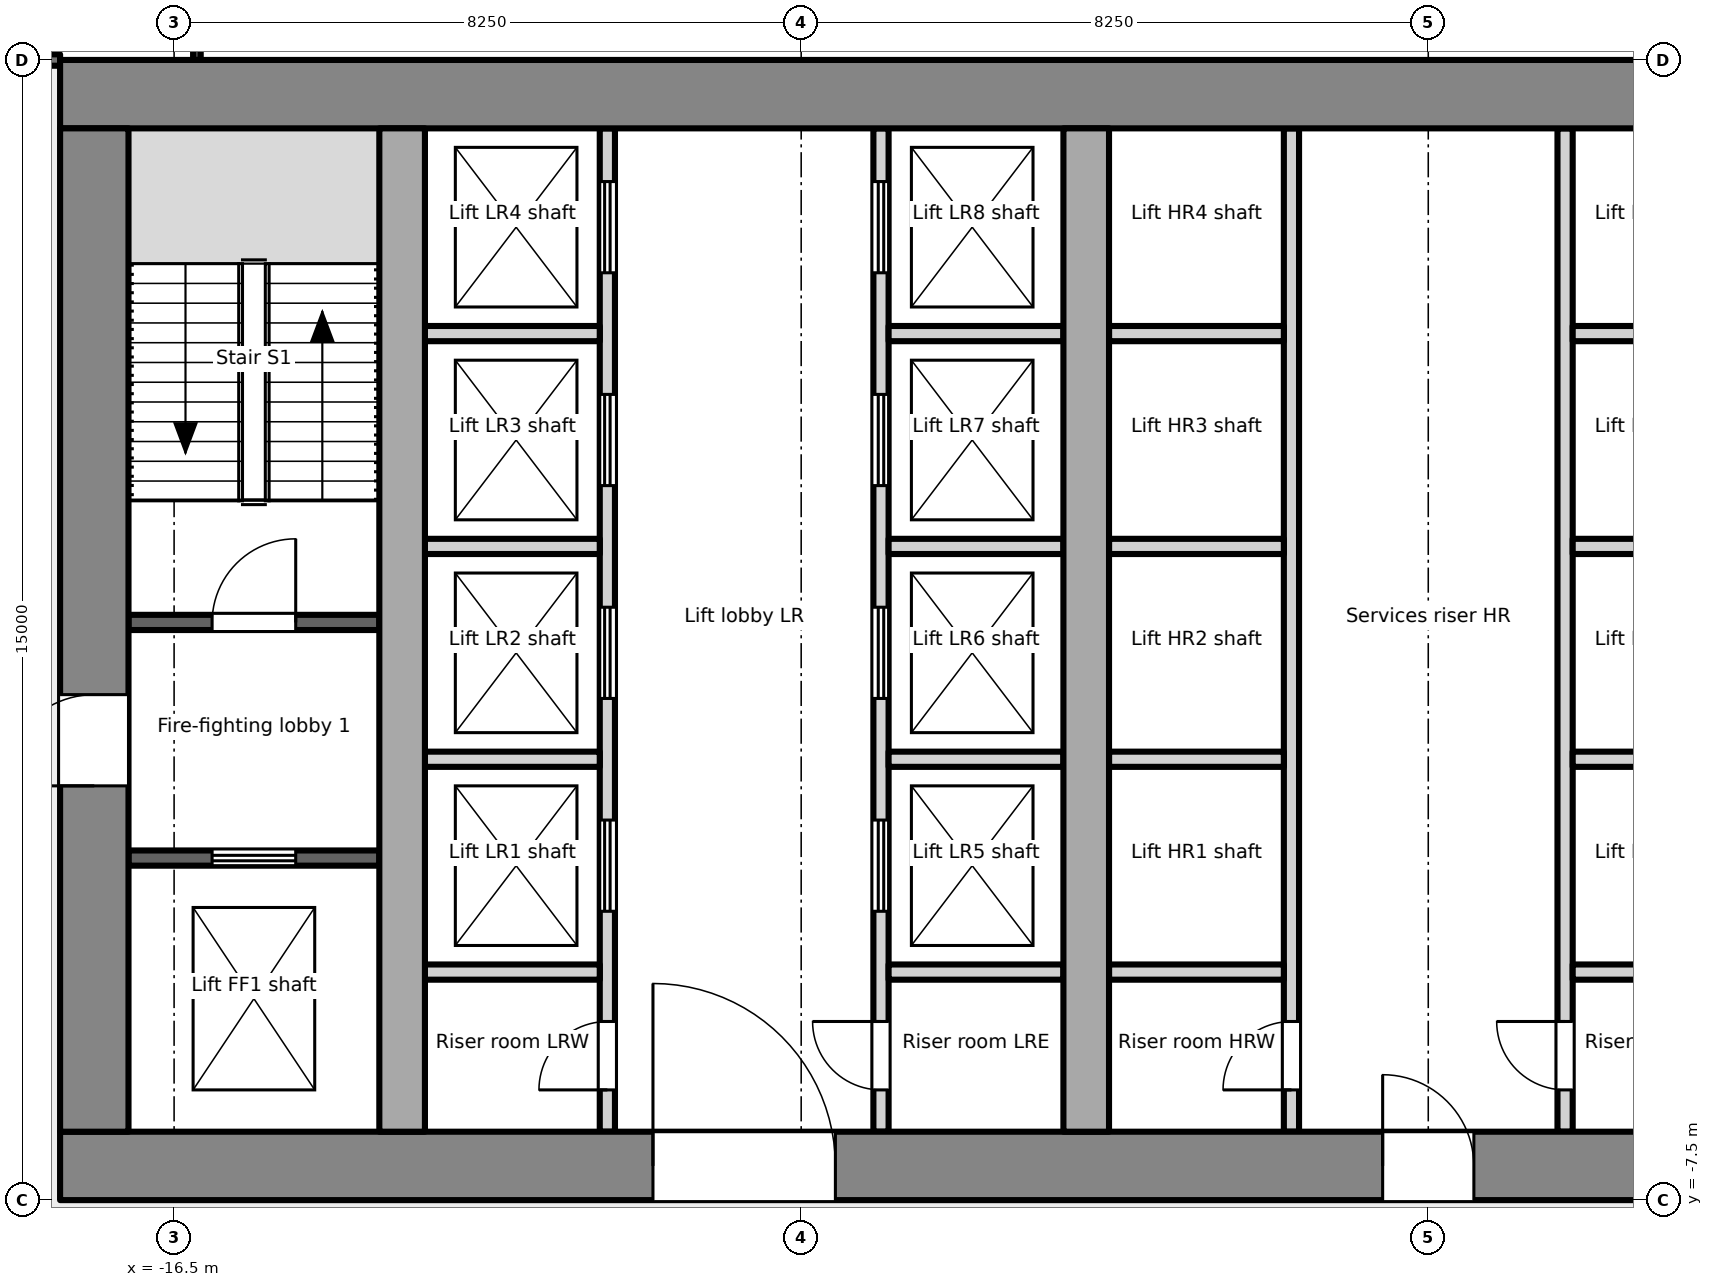
"""IFC4 building model, lengths in metres.
Left out: names, types, materials, properties, quantities, classifications, styles, units other than length and angle.
Written with IfcOpenShell. Run it as: python <this file> out.ifc"""

import sys

from ifc_helpers import new_model, si_unit, direction, frame, frame_2d, origin, place, context, subcontext, project, spatial, rectangle, extrude, element, fill, save


model = new_model("IFC4")
c1 = context("Model", 3, precision=1e-05, world=origin(), true_north=direction((0.0, 1.0)))
c2 = subcontext(c1, "Body", "Model", "MODEL_VIEW")
j1 = project(units=[si_unit("LENGTHUNIT", "METRE"), si_unit("PLANEANGLEUNIT", "RADIAN")], contexts=[c1])
p1 = place(None, origin())
s1 = spatial("IfcSite", under=j1, at=p1, CompositionType="ELEMENT")
p2 = place(p1, origin())
s2 = spatial("IfcBuilding", under=s1, at=p2, CompositionType="ELEMENT")
p3 = place(p2, frame((0.0, 0.0, 12.6)))
s3 = spatial("IfcBuildingStorey", under=s2, at=p3, CompositionType="ELEMENT", Elevation=12.6)
p4 = place(p3, frame((-18.0, -7.05, -0.2), z_axis=(0.0, 0.0, 1.0), x_axis=(1.0, 0.0, 0.0)))
e1 = element("IfcWall", 1, at=p4, inside=s3, PredefinedType="SHEAR", context=c2, shape_type="SweptSolid", body=[
    extrude(rectangle(XDim=36.0, YDim=0.9, at=frame_2d((18.0, 0.0))), origin(), (0.0, 0.0, 1.0), 4.8),
])
p5 = place(p4, frame((7.8, 0.0, 0.2)))
e2 = element("IfcOpeningElement", 2, at=p5, cuts=e1, PredefinedType="OPENING", context=c2, shape_type="SweptSolid", body=[
    extrude(rectangle(XDim=2.4, YDim=2.1, at=frame_2d((1.2, 1.05))), frame((0.0, 0.46, 0.0), z_axis=(0.0, -1.0, 0.0), x_axis=(1.0, 0.0, 0.0)), (0.0, 0.0, 1.0), 0.921),
])
p6 = place(p4, frame((17.4, 0.0, 0.2)))
e3 = element("IfcOpeningElement", 3, at=p6, cuts=e1, PredefinedType="OPENING", context=c2, shape_type="SweptSolid", body=[
    extrude(rectangle(XDim=1.2, YDim=2.1, at=frame_2d((0.6, 1.05))), frame((0.0, 0.46, 0.0), z_axis=(0.0, -1.0, 0.0), x_axis=(1.0, 0.0, 0.0)), (0.0, 0.0, 1.0), 0.921),
])
p7 = place(p4, frame((26.1, 0.0, 0.2)))
e4 = element("IfcOpeningElement", 4, at=p7, cuts=e1, PredefinedType="OPENING", context=c2, shape_type="SweptSolid", body=[
    extrude(rectangle(XDim=2.4, YDim=2.1, at=frame_2d((1.2, 1.05))), frame((0.0, 0.46, 0.0), z_axis=(0.0, -1.0, 0.0), x_axis=(1.0, 0.0, 0.0)), (0.0, 0.0, 1.0), 0.921),
])
p8 = place(p3, frame((-18.0, 7.05, -0.2), z_axis=(0.0, 0.0, 1.0), x_axis=(1.0, 0.0, 0.0)))
e5 = element("IfcWall", 5, at=p8, inside=s3, PredefinedType="SHEAR", context=c2, shape_type="SweptSolid", body=[
    extrude(rectangle(XDim=36.0, YDim=0.9, at=frame_2d((18.0, 0.0))), origin(), (0.0, 0.0, 1.0), 4.8),
])
p9 = place(p3, frame((-17.55, -6.6, -0.2), z_axis=(0.0, 0.0, 1.0), x_axis=(0.0, 1.0, 0.0)))
e6 = element("IfcWall", 6, at=p9, inside=s3, PredefinedType="SHEAR", context=c2, shape_type="SweptSolid", body=[
    extrude(rectangle(XDim=13.2, YDim=0.9, at=frame_2d((6.6, 0.0))), origin(), (0.0, 0.0, 1.0), 4.8),
])
p10 = place(p9, frame((4.55, 0.0, 0.2)))
e7 = element("IfcOpeningElement", 7, at=p10, cuts=e6, PredefinedType="OPENING", context=c2, shape_type="SweptSolid", body=[
    extrude(rectangle(XDim=1.2, YDim=2.1, at=frame_2d((0.6, 1.05))), frame((0.0, 0.46, 0.0), z_axis=(0.0, -1.0, 0.0), x_axis=(1.0, 0.0, 0.0)), (0.0, 0.0, 1.0), 0.921),
])
for number, where, z_axis, x_axis in (
    (8, (-13.5, -6.6, -0.2), (0.0, 0.0, 1.0), (0.0, 1.0, 0.0)),
    (9, (-4.5, -6.6, -0.2), (0.0, 0.0, 1.0), (0.0, 1.0, 0.0)),
):
    element("IfcWall", number, at=place(p3, frame(where, z_axis=z_axis, x_axis=x_axis)), inside=s3, PredefinedType="SHEAR", context=c2, shape_type="SweptSolid", body=[
        extrude(rectangle(XDim=13.2, YDim=0.6, at=frame_2d((6.6, 0.0))), origin(), (0.0, 0.0, 1.0), 4.8),
    ])
p11 = place(p3, frame((-17.1, -3.0, 0.0), z_axis=(0.0, 0.0, 1.0), x_axis=(1.0, 0.0, 0.0)))
e10 = element("IfcWall", 10, at=p11, inside=s3, PredefinedType="PARTITIONING", context=c2, shape_type="SweptSolid", body=[
    extrude(rectangle(XDim=3.3, YDim=0.2, at=frame_2d((1.65, 0.0))), origin(), (0.0, 0.0, 1.0), 4.6),
])
p12 = place(p11, frame((1.1, 0.0, 0.0)))
e11 = element("IfcOpeningElement", 11, at=p12, cuts=e10, PredefinedType="OPENING", context=c2, shape_type="SweptSolid", body=[
    extrude(rectangle(XDim=1.1, YDim=2.1, at=frame_2d((0.55, 1.05))), frame((0.0, 0.111, 0.0), z_axis=(0.0, -1.0, 0.0), x_axis=(1.0, 0.0, 0.0)), (0.0, 0.0, 1.0), 0.221),
])
p13 = place(p3, frame((-17.1, 0.1, 0.0), z_axis=(0.0, 0.0, 1.0), x_axis=(1.0, 0.0, 0.0)))
e12 = element("IfcWall", 12, at=p13, inside=s3, PredefinedType="PARTITIONING", context=c2, shape_type="SweptSolid", body=[
    extrude(rectangle(XDim=3.3, YDim=0.2, at=frame_2d((1.65, 0.0))), origin(), (0.0, 0.0, 1.0), 4.6),
])
p14 = place(p13, frame((1.1, 0.0, 0.0)))
e13 = element("IfcOpeningElement", 13, at=p14, cuts=e12, PredefinedType="OPENING", context=c2, shape_type="SweptSolid", body=[
    extrude(rectangle(XDim=1.1, YDim=2.1, at=frame_2d((0.55, 1.05))), frame((0.0, 0.111, 0.0), z_axis=(0.0, -1.0, 0.0), x_axis=(1.0, 0.0, 0.0)), (0.0, 0.0, 1.0), 0.221),
])
p15 = place(p3, frame((-10.8, -6.6, 0.0), z_axis=(0.0, 0.0, 1.0), x_axis=(0.0, 1.0, 0.0)))
e14 = element("IfcWall", 14, at=p15, inside=s3, PredefinedType="PARTITIONING", context=c2, shape_type="SweptSolid", body=[
    extrude(rectangle(XDim=13.2, YDim=0.2, at=frame_2d((6.6, 0.0))), origin(), (0.0, 0.0, 1.0), 4.6),
])
p16 = place(p15, frame((0.55, 0.0, 0.0)))
e15 = element("IfcOpeningElement", 15, at=p16, cuts=e14, PredefinedType="OPENING", context=c2, shape_type="SweptSolid", body=[
    extrude(rectangle(XDim=0.9, YDim=2.1, at=frame_2d((0.45, 1.05))), frame((0.0, 0.111, 0.0), z_axis=(0.0, -1.0, 0.0), x_axis=(1.0, 0.0, 0.0)), (0.0, 0.0, 1.0), 0.221),
])
p17 = place(p15, frame((2.9, 0.0, 0.0)))
e16 = element("IfcOpeningElement", 16, at=p17, cuts=e14, PredefinedType="OPENING", context=c2, shape_type="SweptSolid", body=[
    extrude(rectangle(XDim=1.2, YDim=2.1, at=frame_2d((0.6, 1.05))), frame((0.0, 0.111, 0.0), z_axis=(0.0, -1.0, 0.0), x_axis=(1.0, 0.0, 0.0)), (0.0, 0.0, 1.0), 0.221),
])
p18 = place(p15, frame((5.7, 0.0, 0.0)))
e17 = element("IfcOpeningElement", 17, at=p18, cuts=e14, PredefinedType="OPENING", context=c2, shape_type="SweptSolid", body=[
    extrude(rectangle(XDim=1.2, YDim=2.1, at=frame_2d((0.6, 1.05))), frame((0.0, 0.111, 0.0), z_axis=(0.0, -1.0, 0.0), x_axis=(1.0, 0.0, 0.0)), (0.0, 0.0, 1.0), 0.221),
])
p19 = place(p15, frame((8.5, 0.0, 0.0)))
e18 = element("IfcOpeningElement", 18, at=p19, cuts=e14, PredefinedType="OPENING", context=c2, shape_type="SweptSolid", body=[
    extrude(rectangle(XDim=1.2, YDim=2.1, at=frame_2d((0.6, 1.05))), frame((0.0, 0.111, 0.0), z_axis=(0.0, -1.0, 0.0), x_axis=(1.0, 0.0, 0.0)), (0.0, 0.0, 1.0), 0.221),
])
p20 = place(p15, frame((11.3, 0.0, 0.0)))
e19 = element("IfcOpeningElement", 19, at=p20, cuts=e14, PredefinedType="OPENING", context=c2, shape_type="SweptSolid", body=[
    extrude(rectangle(XDim=1.2, YDim=2.1, at=frame_2d((0.6, 1.05))), frame((0.0, 0.111, 0.0), z_axis=(0.0, -1.0, 0.0), x_axis=(1.0, 0.0, 0.0)), (0.0, 0.0, 1.0), 0.221),
])
p21 = place(p3, frame((-7.2, -6.6, 0.0), z_axis=(0.0, 0.0, 1.0), x_axis=(0.0, 1.0, 0.0)))
e20 = element("IfcWall", 20, at=p21, inside=s3, PredefinedType="PARTITIONING", context=c2, shape_type="SweptSolid", body=[
    extrude(rectangle(XDim=13.2, YDim=0.2, at=frame_2d((6.6, 0.0))), origin(), (0.0, 0.0, 1.0), 4.6),
])
p22 = place(p21, frame((0.55, 0.0, 0.0)))
e21 = element("IfcOpeningElement", 21, at=p22, cuts=e20, PredefinedType="OPENING", context=c2, shape_type="SweptSolid", body=[
    extrude(rectangle(XDim=0.9, YDim=2.1, at=frame_2d((0.45, 1.05))), frame((0.0, 0.111, 0.0), z_axis=(0.0, -1.0, 0.0), x_axis=(1.0, 0.0, 0.0)), (0.0, 0.0, 1.0), 0.221),
])
p23 = place(p21, frame((2.9, 0.0, 0.0)))
e22 = element("IfcOpeningElement", 22, at=p23, cuts=e20, PredefinedType="OPENING", context=c2, shape_type="SweptSolid", body=[
    extrude(rectangle(XDim=1.2, YDim=2.1, at=frame_2d((0.6, 1.05))), frame((0.0, 0.111, 0.0), z_axis=(0.0, -1.0, 0.0), x_axis=(1.0, 0.0, 0.0)), (0.0, 0.0, 1.0), 0.221),
])
p24 = place(p21, frame((5.7, 0.0, 0.0)))
e23 = element("IfcOpeningElement", 23, at=p24, cuts=e20, PredefinedType="OPENING", context=c2, shape_type="SweptSolid", body=[
    extrude(rectangle(XDim=1.2, YDim=2.1, at=frame_2d((0.6, 1.05))), frame((0.0, 0.111, 0.0), z_axis=(0.0, -1.0, 0.0), x_axis=(1.0, 0.0, 0.0)), (0.0, 0.0, 1.0), 0.221),
])
p25 = place(p21, frame((8.5, 0.0, 0.0)))
e24 = element("IfcOpeningElement", 24, at=p25, cuts=e20, PredefinedType="OPENING", context=c2, shape_type="SweptSolid", body=[
    extrude(rectangle(XDim=1.2, YDim=2.1, at=frame_2d((0.6, 1.05))), frame((0.0, 0.111, 0.0), z_axis=(0.0, -1.0, 0.0), x_axis=(1.0, 0.0, 0.0)), (0.0, 0.0, 1.0), 0.221),
])
p26 = place(p21, frame((11.3, 0.0, 0.0)))
e25 = element("IfcOpeningElement", 25, at=p26, cuts=e20, PredefinedType="OPENING", context=c2, shape_type="SweptSolid", body=[
    extrude(rectangle(XDim=1.2, YDim=2.1, at=frame_2d((0.6, 1.05))), frame((0.0, 0.111, 0.0), z_axis=(0.0, -1.0, 0.0), x_axis=(1.0, 0.0, 0.0)), (0.0, 0.0, 1.0), 0.221),
])
for number, where, z_axis, x_axis in (
    (26, (-13.2, -1.7, 0.0), (0.0, 0.0, 1.0), (1.0, 0.0, 0.0)),
    (27, (-13.2, 1.1, 0.0), (0.0, 0.0, 1.0), (1.0, 0.0, 0.0)),
    (28, (-13.2, 3.9, 0.0), (0.0, 0.0, 1.0), (1.0, 0.0, 0.0)),
    (29, (-13.2, -4.5, 0.0), (0.0, 0.0, 1.0), (1.0, 0.0, 0.0)),
    (30, (-7.1, -1.7, 0.0), (0.0, 0.0, 1.0), (1.0, 0.0, 0.0)),
    (31, (-7.1, 1.1, 0.0), (0.0, 0.0, 1.0), (1.0, 0.0, 0.0)),
    (32, (-7.1, 3.9, 0.0), (0.0, 0.0, 1.0), (1.0, 0.0, 0.0)),
    (33, (-7.1, -4.5, 0.0), (0.0, 0.0, 1.0), (1.0, 0.0, 0.0)),
):
    element("IfcWall", number, at=place(p3, frame(where, z_axis=z_axis, x_axis=x_axis)), inside=s3, PredefinedType="PARTITIONING", context=c2, shape_type="SweptSolid", body=[
        extrude(rectangle(XDim=2.3, YDim=0.2, at=frame_2d((1.15, 0.0))), origin(), (0.0, 0.0, 1.0), 4.6),
    ])
p27 = place(p3, frame((-1.8, -6.6, 0.0), z_axis=(0.0, 0.0, 1.0), x_axis=(0.0, 1.0, 0.0)))
e34 = element("IfcWall", 34, at=p27, inside=s3, PredefinedType="PARTITIONING", context=c2, shape_type="SweptSolid", body=[
    extrude(rectangle(XDim=13.2, YDim=0.2, at=frame_2d((6.6, 0.0))), origin(), (0.0, 0.0, 1.0), 4.6),
])
p28 = place(p27, frame((0.55, 0.0, 0.0)))
e35 = element("IfcOpeningElement", 35, at=p28, cuts=e34, PredefinedType="OPENING", context=c2, shape_type="SweptSolid", body=[
    extrude(rectangle(XDim=0.9, YDim=2.1, at=frame_2d((0.45, 1.05))), frame((0.0, 0.111, 0.0), z_axis=(0.0, -1.0, 0.0), x_axis=(1.0, 0.0, 0.0)), (0.0, 0.0, 1.0), 0.221),
])
p29 = place(p3, frame((1.8, -6.6, 0.0), z_axis=(0.0, 0.0, 1.0), x_axis=(0.0, 1.0, 0.0)))
e36 = element("IfcWall", 36, at=p29, inside=s3, PredefinedType="PARTITIONING", context=c2, shape_type="SweptSolid", body=[
    extrude(rectangle(XDim=13.2, YDim=0.2, at=frame_2d((6.6, 0.0))), origin(), (0.0, 0.0, 1.0), 4.6),
])
p30 = place(p29, frame((0.55, 0.0, 0.0)))
e37 = element("IfcOpeningElement", 37, at=p30, cuts=e36, PredefinedType="OPENING", context=c2, shape_type="SweptSolid", body=[
    extrude(rectangle(XDim=0.9, YDim=2.1, at=frame_2d((0.45, 1.05))), frame((0.0, 0.111, 0.0), z_axis=(0.0, -1.0, 0.0), x_axis=(1.0, 0.0, 0.0)), (0.0, 0.0, 1.0), 0.221),
])
for number, where, z_axis, x_axis in (
    (38, (-4.2, -1.7, 0.0), (0.0, 0.0, 1.0), (1.0, 0.0, 0.0)),
    (39, (-4.2, 1.1, 0.0), (0.0, 0.0, 1.0), (1.0, 0.0, 0.0)),
    (40, (-4.2, 3.9, 0.0), (0.0, 0.0, 1.0), (1.0, 0.0, 0.0)),
    (41, (-4.2, -4.5, 0.0), (0.0, 0.0, 1.0), (1.0, 0.0, 0.0)),
    (42, (1.9, -1.7, 0.0), (0.0, 0.0, 1.0), (1.0, 0.0, 0.0)),
    (43, (1.9, 1.1, 0.0), (0.0, 0.0, 1.0), (1.0, 0.0, 0.0)),
    (44, (1.9, 3.9, 0.0), (0.0, 0.0, 1.0), (1.0, 0.0, 0.0)),
    (45, (1.9, -4.5, 0.0), (0.0, 0.0, 1.0), (1.0, 0.0, 0.0)),
):
    element("IfcWall", number, at=place(p3, frame(where, z_axis=z_axis, x_axis=x_axis)), inside=s3, PredefinedType="PARTITIONING", context=c2, shape_type="SweptSolid", body=[
        extrude(rectangle(XDim=2.3, YDim=0.2, at=frame_2d((1.15, 0.0))), origin(), (0.0, 0.0, 1.0), 4.6),
    ])
p31 = place(p3, frame((-20.91, 7.499, 0.0), z_axis=(0.0, 0.0, 1.0), x_axis=(1.0, 0.0, 0.0)))
e46 = element("IfcWall", 46, at=p31, inside=s3, PredefinedType="PARTITIONING", context=c2, shape_type="SweptSolid", body=[
    extrude(rectangle(XDim=2.91, YDim=0.15, at=frame_2d((1.455, 0.0))), origin(), (0.0, 0.0, 1.0), 4.3),
])
p32 = place(p3, frame((-16.2, 7.5, 0.0), z_axis=(0.0, 0.0, 1.0), x_axis=(0.0, 1.0, 0.0)))
e47 = element("IfcWall", 47, at=p32, inside=s3, PredefinedType="PARTITIONING", context=c2, shape_type="SweptSolid", body=[
    extrude(rectangle(XDim=2.95, YDim=0.1, at=frame_2d((1.475, 0.0))), origin(), (0.0, 0.0, 1.0), 4.6),
])
p33 = place(p12, origin())
e48 = element("IfcDoor", 48, at=p33, inside=s3, OperationType="DOUBLE_DOOR_SLIDING", PredefinedType="DOOR", context=c2, shape_type="SweptSolid", body=[
    extrude(rectangle(XDim=1.1, YDim=2.1, at=frame_2d((0.55, 1.05))), frame((0.0, 0.025, 0.0), z_axis=(0.0, -1.0, 0.0), x_axis=(1.0, 0.0, 0.0)), (0.0, 0.0, 1.0), 0.05),
])
fill(e11, e48)
p34 = place(p10, origin())
e49 = element("IfcDoor", 49, at=p34, inside=s3, OperationType="SINGLE_SWING_LEFT", PredefinedType="DOOR", context=c2, shape_type="SweptSolid", body=[
    extrude(rectangle(XDim=1.2, YDim=2.1, at=frame_2d((0.6, 1.05))), frame((0.0, 0.025, 0.0), z_axis=(0.0, -1.0, 0.0), x_axis=(1.0, 0.0, 0.0)), (0.0, 0.0, 1.0), 0.05),
])
fill(e7, e49)
p35 = place(p14, origin())
e50 = element("IfcDoor", 50, at=p35, inside=s3, OperationType="SINGLE_SWING_RIGHT", PredefinedType="DOOR", context=c2, shape_type="SweptSolid", body=[
    extrude(rectangle(XDim=1.1, YDim=2.1, at=frame_2d((0.55, 1.05))), frame((0.0, 0.025, 0.0), z_axis=(0.0, -1.0, 0.0), x_axis=(1.0, 0.0, 0.0)), (0.0, 0.0, 1.0), 0.05),
])
fill(e13, e50)
p36 = place(p16, origin())
e51 = element("IfcDoor", 51, at=p36, inside=s3, OperationType="SINGLE_SWING_LEFT", PredefinedType="DOOR", context=c2, shape_type="SweptSolid", body=[
    extrude(rectangle(XDim=0.9, YDim=2.1, at=frame_2d((0.45, 1.05))), frame((0.0, 0.025, 0.0), z_axis=(0.0, -1.0, 0.0), x_axis=(1.0, 0.0, 0.0)), (0.0, 0.0, 1.0), 0.05),
])
fill(e15, e51)
p37 = place(p17, origin())
e52 = element("IfcDoor", 52, at=p37, inside=s3, OperationType="DOUBLE_DOOR_SLIDING", PredefinedType="DOOR", context=c2, shape_type="SweptSolid", body=[
    extrude(rectangle(XDim=1.2, YDim=2.1, at=frame_2d((0.6, 1.05))), frame((0.0, 0.025, 0.0), z_axis=(0.0, -1.0, 0.0), x_axis=(1.0, 0.0, 0.0)), (0.0, 0.0, 1.0), 0.05),
])
fill(e16, e52)
p38 = place(p18, origin())
e53 = element("IfcDoor", 53, at=p38, inside=s3, OperationType="DOUBLE_DOOR_SLIDING", PredefinedType="DOOR", context=c2, shape_type="SweptSolid", body=[
    extrude(rectangle(XDim=1.2, YDim=2.1, at=frame_2d((0.6, 1.05))), frame((0.0, 0.025, 0.0), z_axis=(0.0, -1.0, 0.0), x_axis=(1.0, 0.0, 0.0)), (0.0, 0.0, 1.0), 0.05),
])
fill(e17, e53)
p39 = place(p19, origin())
e54 = element("IfcDoor", 54, at=p39, inside=s3, OperationType="DOUBLE_DOOR_SLIDING", PredefinedType="DOOR", context=c2, shape_type="SweptSolid", body=[
    extrude(rectangle(XDim=1.2, YDim=2.1, at=frame_2d((0.6, 1.05))), frame((0.0, 0.025, 0.0), z_axis=(0.0, -1.0, 0.0), x_axis=(1.0, 0.0, 0.0)), (0.0, 0.0, 1.0), 0.05),
])
fill(e18, e54)
p40 = place(p20, origin())
e55 = element("IfcDoor", 55, at=p40, inside=s3, OperationType="DOUBLE_DOOR_SLIDING", PredefinedType="DOOR", context=c2, shape_type="SweptSolid", body=[
    extrude(rectangle(XDim=1.2, YDim=2.1, at=frame_2d((0.6, 1.05))), frame((0.0, 0.025, 0.0), z_axis=(0.0, -1.0, 0.0), x_axis=(1.0, 0.0, 0.0)), (0.0, 0.0, 1.0), 0.05),
])
fill(e19, e55)
p41 = place(p22, origin())
e56 = element("IfcDoor", 56, at=p41, inside=s3, OperationType="SINGLE_SWING_RIGHT", PredefinedType="DOOR", context=c2, shape_type="SweptSolid", body=[
    extrude(rectangle(XDim=0.9, YDim=2.1, at=frame_2d((0.45, 1.05))), frame((0.0, 0.025, 0.0), z_axis=(0.0, -1.0, 0.0), x_axis=(1.0, 0.0, 0.0)), (0.0, 0.0, 1.0), 0.05),
])
fill(e21, e56)
p42 = place(p23, origin())
e57 = element("IfcDoor", 57, at=p42, inside=s3, OperationType="DOUBLE_DOOR_SLIDING", PredefinedType="DOOR", context=c2, shape_type="SweptSolid", body=[
    extrude(rectangle(XDim=1.2, YDim=2.1, at=frame_2d((0.6, 1.05))), frame((0.0, 0.025, 0.0), z_axis=(0.0, -1.0, 0.0), x_axis=(1.0, 0.0, 0.0)), (0.0, 0.0, 1.0), 0.05),
])
fill(e22, e57)
p43 = place(p24, origin())
e58 = element("IfcDoor", 58, at=p43, inside=s3, OperationType="DOUBLE_DOOR_SLIDING", PredefinedType="DOOR", context=c2, shape_type="SweptSolid", body=[
    extrude(rectangle(XDim=1.2, YDim=2.1, at=frame_2d((0.6, 1.05))), frame((0.0, 0.025, 0.0), z_axis=(0.0, -1.0, 0.0), x_axis=(1.0, 0.0, 0.0)), (0.0, 0.0, 1.0), 0.05),
])
fill(e23, e58)
p44 = place(p25, origin())
e59 = element("IfcDoor", 59, at=p44, inside=s3, OperationType="DOUBLE_DOOR_SLIDING", PredefinedType="DOOR", context=c2, shape_type="SweptSolid", body=[
    extrude(rectangle(XDim=1.2, YDim=2.1, at=frame_2d((0.6, 1.05))), frame((0.0, 0.025, 0.0), z_axis=(0.0, -1.0, 0.0), x_axis=(1.0, 0.0, 0.0)), (0.0, 0.0, 1.0), 0.05),
])
fill(e24, e59)
p45 = place(p26, origin())
e60 = element("IfcDoor", 60, at=p45, inside=s3, OperationType="DOUBLE_DOOR_SLIDING", PredefinedType="DOOR", context=c2, shape_type="SweptSolid", body=[
    extrude(rectangle(XDim=1.2, YDim=2.1, at=frame_2d((0.6, 1.05))), frame((0.0, 0.025, 0.0), z_axis=(0.0, -1.0, 0.0), x_axis=(1.0, 0.0, 0.0)), (0.0, 0.0, 1.0), 0.05),
])
fill(e25, e60)
p46 = place(p5, origin())
e61 = element("IfcDoor", 61, at=p46, inside=s3, OperationType="DOUBLE_DOOR_DOUBLE_SWING", PredefinedType="DOOR", context=c2, shape_type="SweptSolid", body=[
    extrude(rectangle(XDim=2.4, YDim=2.1, at=frame_2d((1.2, 1.05))), frame((0.0, 0.025, 0.0), z_axis=(0.0, -1.0, 0.0), x_axis=(1.0, 0.0, 0.0)), (0.0, 0.0, 1.0), 0.05),
])
fill(e2, e61)
p47 = place(p28, origin())
e62 = element("IfcDoor", 62, at=p47, inside=s3, OperationType="SINGLE_SWING_LEFT", PredefinedType="DOOR", context=c2, shape_type="SweptSolid", body=[
    extrude(rectangle(XDim=0.9, YDim=2.1, at=frame_2d((0.45, 1.05))), frame((0.0, 0.025, 0.0), z_axis=(0.0, -1.0, 0.0), x_axis=(1.0, 0.0, 0.0)), (0.0, 0.0, 1.0), 0.05),
])
fill(e35, e62)
p48 = place(p30, origin())
e63 = element("IfcDoor", 63, at=p48, inside=s3, OperationType="SINGLE_SWING_RIGHT", PredefinedType="DOOR", context=c2, shape_type="SweptSolid", body=[
    extrude(rectangle(XDim=0.9, YDim=2.1, at=frame_2d((0.45, 1.05))), frame((0.0, 0.025, 0.0), z_axis=(0.0, -1.0, 0.0), x_axis=(1.0, 0.0, 0.0)), (0.0, 0.0, 1.0), 0.05),
])
fill(e37, e63)
p49 = place(p6, origin())
e64 = element("IfcDoor", 64, at=p49, inside=s3, OperationType="SINGLE_SWING_LEFT", PredefinedType="DOOR", context=c2, shape_type="SweptSolid", body=[
    extrude(rectangle(XDim=1.2, YDim=2.1, at=frame_2d((0.6, 1.05))), frame((0.0, 0.025, 0.0), z_axis=(0.0, -1.0, 0.0), x_axis=(1.0, 0.0, 0.0)), (0.0, 0.0, 1.0), 0.05),
])
fill(e3, e64)
save(model, sys.argv[1])
